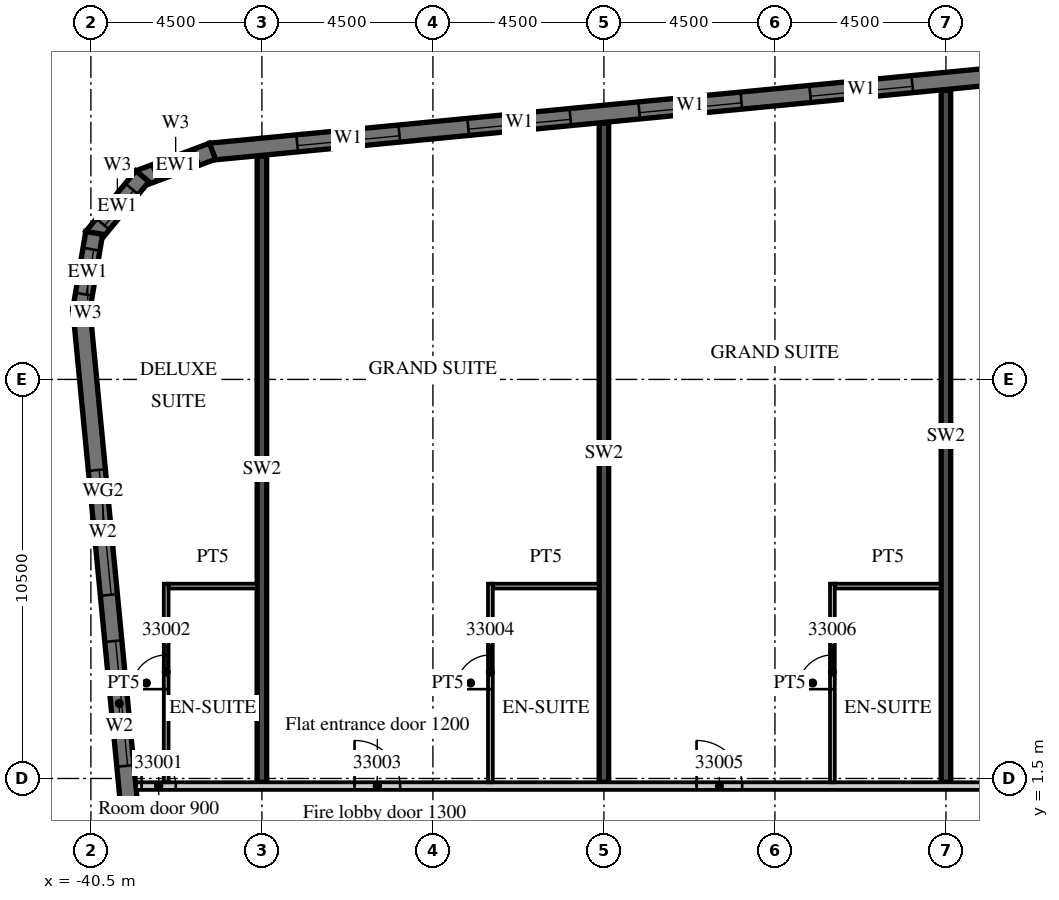
"""IFC4 building model, lengths in metres.
Left out: names, types, materials, properties, quantities, classifications, styles, units other than length and angle.
Written with IfcOpenShell. Run it as: python <this file> out.ifc"""

import sys

from ifc_helpers import new_model, si_unit, direction, frame, frame_2d, origin, place, context, subcontext, project, spatial, polyline, rectangle, outline, extrude, element, fill, save


model = new_model("IFC4")
c1 = context("Model", 3, precision=1e-05, world=origin(), true_north=direction((0.0, 1.0)))
c2 = subcontext(c1, "Body", "Model", "MODEL_VIEW")
j1 = project(units=[si_unit("LENGTHUNIT", "METRE"), si_unit("PLANEANGLEUNIT", "RADIAN")], contexts=[c1])
p1 = place(None, origin())
s1 = spatial("IfcSite", under=j1, at=p1, CompositionType="ELEMENT")
p2 = place(p1, origin())
s2 = spatial("IfcBuilding", under=s1, at=p2, CompositionType="ELEMENT")
p3 = place(p2, frame((0.0, 0.0, 143.8)))
s3 = spatial("IfcBuildingStorey", under=s2, at=p3, CompositionType="ELEMENT", Elevation=143.8)
p4 = place(p3, frame((-36.0, 1.4, 0.0), z_axis=(0.0, 0.0, 1.0), x_axis=(0.0, 1.0, 0.0)))
e1 = element("IfcWall", 1, at=p4, inside=s3, PredefinedType="SHEAR", context=c2, shape_type="SweptSolid", body=[
    extrude(rectangle(XDim=16.474, YDim=0.25, at=frame_2d((8.237, 0.0))), origin(), (0.0, 0.0, 1.0), 3.3),
])
p5 = place(p3, frame((-27.0, 1.4, 0.0), z_axis=(0.0, 0.0, 1.0), x_axis=(0.0, 1.0, 0.0)))
e2 = element("IfcWall", 2, at=p5, inside=s3, PredefinedType="SHEAR", context=c2, shape_type="SweptSolid", body=[
    extrude(rectangle(XDim=17.34, YDim=0.25, at=frame_2d((8.67, 0.0))), origin(), (0.0, 0.0, 1.0), 3.3),
])
p6 = place(p3, frame((-18.0, 1.4, 0.0), z_axis=(0.0, 0.0, 1.0), x_axis=(0.0, 1.0, 0.0)))
e3 = element("IfcWall", 3, at=p6, inside=s3, PredefinedType="SHEAR", context=c2, shape_type="SweptSolid", body=[
    extrude(rectangle(XDim=18.207, YDim=0.25, at=frame_2d((9.104, 0.0))), origin(), (0.0, 0.0, 1.0), 3.3),
])
p7 = place(p3, frame((-40.753, 13.872, 0.0), z_axis=(0.0, 0.0, 1.0), x_axis=(0.095843327381, -0.995396431878, 0.0)))
e4 = element("IfcWall", 4, at=p7, inside=s3, PredefinedType="SOLIDWALL", context=c2, shape_type="SweptSolid", body=[
    extrude(rectangle(XDim=35.0, YDim=0.45, at=frame_2d((17.5, 0.0))), origin(), (0.0, 0.0, 1.0), 3.02),
])
p8 = place(p7, frame((4.277, 0.0, 0.45)))
e5 = element("IfcOpeningElement", 5, at=p8, cuts=e4, PredefinedType="OPENING", context=c2, shape_type="SweptSolid", body=[
    extrude(rectangle(XDim=3.3, YDim=2.25, at=frame_2d((1.65, 1.125))), frame((0.0, 0.235, 0.0), z_axis=(0.0, -1.0, 0.0), x_axis=(1.0, 0.0, 0.0)), (0.0, 0.0, 1.0), 0.47),
])
p9 = place(p7, frame((8.798, 0.0, 0.45)))
e6 = element("IfcOpeningElement", 6, at=p9, cuts=e4, PredefinedType="OPENING", context=c2, shape_type="SweptSolid", body=[
    extrude(rectangle(XDim=3.3, YDim=2.25, at=frame_2d((1.65, 1.125))), frame((0.0, 0.235, 0.0), z_axis=(0.0, -1.0, 0.0), x_axis=(1.0, 0.0, 0.0)), (0.0, 0.0, 1.0), 0.47),
])
p10 = place(p3, frame((13.521, 22.89, 0.0), z_axis=(0.0, 0.0, 1.0), x_axis=(-0.995396445054, -0.095843190545, 0.0)))
e7 = element("IfcWall", 7, at=p10, inside=s3, PredefinedType="SOLIDWALL", context=c2, shape_type="SweptSolid", body=[
    extrude(rectangle(XDim=51.114, YDim=0.45, at=frame_2d((25.557, 0.0))), origin(), (0.0, 0.0, 1.0), 3.02),
])
p11 = place(p10, frame((0.91, 0.0, 0.45)))
e8 = element("IfcOpeningElement", 8, at=p11, cuts=e7, PredefinedType="OPENING", context=c2, shape_type="SweptSolid", body=[
    extrude(rectangle(XDim=2.7, YDim=2.25, at=frame_2d((1.35, 1.125))), frame((0.0, 0.235, 0.0), z_axis=(0.0, -1.0, 0.0), x_axis=(1.0, 0.0, 0.0)), (0.0, 0.0, 1.0), 0.47),
])
p12 = place(p10, frame((5.431, 0.0, 0.45)))
e9 = element("IfcOpeningElement", 9, at=p12, cuts=e7, PredefinedType="OPENING", context=c2, shape_type="SweptSolid", body=[
    extrude(rectangle(XDim=2.7, YDim=2.25, at=frame_2d((1.35, 1.125))), frame((0.0, 0.235, 0.0), z_axis=(0.0, -1.0, 0.0), x_axis=(1.0, 0.0, 0.0)), (0.0, 0.0, 1.0), 0.47),
])
p13 = place(p10, frame((9.952, 0.0, 0.45)))
e10 = element("IfcOpeningElement", 10, at=p13, cuts=e7, PredefinedType="OPENING", context=c2, shape_type="SweptSolid", body=[
    extrude(rectangle(XDim=2.7, YDim=2.25, at=frame_2d((1.35, 1.125))), frame((0.0, 0.235, 0.0), z_axis=(0.0, -1.0, 0.0), x_axis=(1.0, 0.0, 0.0)), (0.0, 0.0, 1.0), 0.47),
])
p14 = place(p10, frame((14.473, 0.0, 0.45)))
e11 = element("IfcOpeningElement", 11, at=p14, cuts=e7, PredefinedType="OPENING", context=c2, shape_type="SweptSolid", body=[
    extrude(rectangle(XDim=2.7, YDim=2.25, at=frame_2d((1.35, 1.125))), frame((0.0, 0.235, 0.0), z_axis=(0.0, -1.0, 0.0), x_axis=(1.0, 0.0, 0.0)), (0.0, 0.0, 1.0), 0.47),
])
p15 = place(p10, frame((18.994, 0.0, 0.45)))
e12 = element("IfcOpeningElement", 12, at=p15, cuts=e7, PredefinedType="OPENING", context=c2, shape_type="SweptSolid", body=[
    extrude(rectangle(XDim=2.7, YDim=2.25, at=frame_2d((1.35, 1.125))), frame((0.0, 0.235, 0.0), z_axis=(0.0, -1.0, 0.0), x_axis=(1.0, 0.0, 0.0)), (0.0, 0.0, 1.0), 0.47),
])
p16 = place(p10, frame((23.514, 0.0, 0.45)))
e13 = element("IfcOpeningElement", 13, at=p16, cuts=e7, PredefinedType="OPENING", context=c2, shape_type="SweptSolid", body=[
    extrude(rectangle(XDim=2.7, YDim=2.25, at=frame_2d((1.35, 1.125))), frame((0.0, 0.235, 0.0), z_axis=(0.0, -1.0, 0.0), x_axis=(1.0, 0.0, 0.0)), (0.0, 0.0, 1.0), 0.47),
])
p17 = place(p10, frame((28.035, 0.0, 0.45)))
e14 = element("IfcOpeningElement", 14, at=p17, cuts=e7, PredefinedType="OPENING", context=c2, shape_type="SweptSolid", body=[
    extrude(rectangle(XDim=2.7, YDim=2.25, at=frame_2d((1.35, 1.125))), frame((0.0, 0.235, 0.0), z_axis=(0.0, -1.0, 0.0), x_axis=(1.0, 0.0, 0.0)), (0.0, 0.0, 1.0), 0.47),
])
p18 = place(p10, frame((32.556, 0.0, 0.45)))
e15 = element("IfcOpeningElement", 15, at=p18, cuts=e7, PredefinedType="OPENING", context=c2, shape_type="SweptSolid", body=[
    extrude(rectangle(XDim=2.7, YDim=2.25, at=frame_2d((1.35, 1.125))), frame((0.0, 0.235, 0.0), z_axis=(0.0, -1.0, 0.0), x_axis=(1.0, 0.0, 0.0)), (0.0, 0.0, 1.0), 0.47),
])
p19 = place(p10, frame((37.077, 0.0, 0.45)))
e16 = element("IfcOpeningElement", 16, at=p19, cuts=e7, PredefinedType="OPENING", context=c2, shape_type="SweptSolid", body=[
    extrude(rectangle(XDim=2.7, YDim=2.25, at=frame_2d((1.35, 1.125))), frame((0.0, 0.235, 0.0), z_axis=(0.0, -1.0, 0.0), x_axis=(1.0, 0.0, 0.0)), (0.0, 0.0, 1.0), 0.47),
])
p20 = place(p10, frame((41.598, 0.0, 0.45)))
e17 = element("IfcOpeningElement", 17, at=p20, cuts=e7, PredefinedType="OPENING", context=c2, shape_type="SweptSolid", body=[
    extrude(rectangle(XDim=2.7, YDim=2.25, at=frame_2d((1.35, 1.125))), frame((0.0, 0.235, 0.0), z_axis=(0.0, -1.0, 0.0), x_axis=(1.0, 0.0, 0.0)), (0.0, 0.0, 1.0), 0.47),
])
p21 = place(p10, frame((46.118, 0.0, 0.45)))
e18 = element("IfcOpeningElement", 18, at=p21, cuts=e7, PredefinedType="OPENING", context=c2, shape_type="SweptSolid", body=[
    extrude(rectangle(XDim=2.7, YDim=2.25, at=frame_2d((1.35, 1.125))), frame((0.0, 0.235, 0.0), z_axis=(0.0, -1.0, 0.0), x_axis=(1.0, 0.0, 0.0)), (0.0, 0.0, 1.0), 0.47),
])
p22 = place(p3, frame((-37.3, 18.004, 0.0), z_axis=(0.0, 0.0, 1.0), x_axis=(-0.936677599948, -0.350192909346, 0.0)))
e19 = element("IfcWall", 19, at=p22, inside=s3, PredefinedType="SOLIDWALL", context=c2, shape_type="SweptSolid", body=[
    extrude(outline(polyline([(0.0, -0.225), (2.071, -0.225), (1.95, 0.225), (0.121, 0.225), (0.0, -0.225)])), origin(), (0.0, 0.0, 1.0), 3.02),
])
p23 = place(p22, frame((0.435, 0.0, 0.45)))
e20 = element("IfcOpeningElement", 20, at=p23, cuts=e19, PredefinedType="OPENING", context=c2, shape_type="SweptSolid", body=[
    extrude(rectangle(XDim=1.2, YDim=2.25, at=frame_2d((0.6, 1.125))), frame((0.0, 0.235, 0.0), z_axis=(0.0, -1.0, 0.0), x_axis=(1.0, 0.0, 0.0)), (0.0, 0.0, 1.0), 0.47),
])
p24 = place(p3, frame((-39.145, 17.347, 0.0), z_axis=(0.0, 0.0, 1.0), x_axis=(-0.636046112757, -0.771651049663, 0.0)))
e21 = element("IfcWall", 21, at=p24, inside=s3, PredefinedType="SOLIDWALL", context=c2, shape_type="SweptSolid", body=[
    extrude(outline(polyline([(0.0, -0.225), (2.071, -0.225), (1.95, 0.225), (0.121, 0.225), (0.0, -0.225)])), origin(), (0.0, 0.0, 1.0), 3.02),
])
p25 = place(p24, frame((0.435, 0.0, 0.45)))
e22 = element("IfcOpeningElement", 22, at=p25, cuts=e21, PredefinedType="OPENING", context=c2, shape_type="SweptSolid", body=[
    extrude(rectangle(XDim=1.2, YDim=2.25, at=frame_2d((0.6, 1.125))), frame((0.0, 0.235, 0.0), z_axis=(0.0, -1.0, 0.0), x_axis=(1.0, 0.0, 0.0)), (0.0, 0.0, 1.0), 0.47),
])
p26 = place(p3, frame((-40.413, 15.855, 0.0), z_axis=(0.0, 0.0, 1.0), x_axis=(-0.165068144653, -0.986282164302, 0.0)))
e23 = element("IfcWall", 23, at=p26, inside=s3, PredefinedType="SOLIDWALL", context=c2, shape_type="SweptSolid", body=[
    extrude(outline(polyline([(0.0, -0.225), (2.071, -0.225), (1.95, 0.225), (0.121, 0.225), (0.0, -0.225)])), origin(), (0.0, 0.0, 1.0), 3.02),
])
p27 = place(p26, frame((0.435, 0.0, 0.45)))
e24 = element("IfcOpeningElement", 24, at=p27, cuts=e23, PredefinedType="OPENING", context=c2, shape_type="SweptSolid", body=[
    extrude(rectangle(XDim=1.2, YDim=2.25, at=frame_2d((0.6, 1.125))), frame((0.0, 0.235, 0.0), z_axis=(0.0, -1.0, 0.0), x_axis=(1.0, 0.0, 0.0)), (0.0, 0.0, 1.0), 0.47),
])
p28 = place(p3, frame((-39.316, 1.3, 0.0), z_axis=(0.0, 0.0, 1.0), x_axis=(1.0, 0.0, 0.0)))
e25 = element("IfcWall", 25, at=p28, inside=s3, PredefinedType="PARTITIONING", context=c2, shape_type="SweptSolid", body=[
    extrude(rectangle(XDim=52.816, YDim=0.2, at=frame_2d((26.408, 0.0))), origin(), (0.0, 0.0, 1.0), 3.02),
])
p29 = place(p28, frame((0.15, 0.0, 0.0)))
e26 = element("IfcOpeningElement", 26, at=p29, cuts=e25, PredefinedType="OPENING", context=c2, shape_type="SweptSolid", body=[
    extrude(rectangle(XDim=0.9, YDim=2.1, at=frame_2d((0.45, 1.05))), frame((0.0, 0.11, 0.0), z_axis=(0.0, -1.0, 0.0), x_axis=(1.0, 0.0, 0.0)), (0.0, 0.0, 1.0), 0.22),
])
p30 = place(p28, frame((5.754, 0.0, 0.0)))
e27 = element("IfcOpeningElement", 27, at=p30, cuts=e25, PredefinedType="OPENING", context=c2, shape_type="SweptSolid", body=[
    extrude(rectangle(XDim=1.2, YDim=2.1, at=frame_2d((0.6, 1.05))), frame((0.0, 0.11, 0.0), z_axis=(0.0, -1.0, 0.0), x_axis=(1.0, 0.0, 0.0)), (0.0, 0.0, 1.0), 0.22),
])
p31 = place(p28, frame((14.754, 0.0, 0.0)))
e28 = element("IfcOpeningElement", 28, at=p31, cuts=e25, PredefinedType="OPENING", context=c2, shape_type="SweptSolid", body=[
    extrude(rectangle(XDim=1.2, YDim=2.1, at=frame_2d((0.6, 1.05))), frame((0.0, 0.11, 0.0), z_axis=(0.0, -1.0, 0.0), x_axis=(1.0, 0.0, 0.0)), (0.0, 0.0, 1.0), 0.22),
])
p32 = place(p28, frame((23.754, 0.0, 0.0)))
e29 = element("IfcOpeningElement", 29, at=p32, cuts=e25, PredefinedType="OPENING", context=c2, shape_type="SweptSolid", body=[
    extrude(rectangle(XDim=1.2, YDim=2.1, at=frame_2d((0.6, 1.05))), frame((0.0, 0.11, 0.0), z_axis=(0.0, -1.0, 0.0), x_axis=(1.0, 0.0, 0.0)), (0.0, 0.0, 1.0), 0.22),
])
p33 = place(p28, frame((35.678, 0.0, 0.0)))
e30 = element("IfcOpeningElement", 30, at=p33, cuts=e25, PredefinedType="OPENING", context=c2, shape_type="SweptSolid", body=[
    extrude(rectangle(XDim=1.2, YDim=2.1, at=frame_2d((0.6, 1.05))), frame((0.0, 0.11, 0.0), z_axis=(0.0, -1.0, 0.0), x_axis=(1.0, 0.0, 0.0)), (0.0, 0.0, 1.0), 0.22),
])
p34 = place(p28, frame((44.678, 0.0, 0.0)))
e31 = element("IfcOpeningElement", 31, at=p34, cuts=e25, PredefinedType="OPENING", context=c2, shape_type="SweptSolid", body=[
    extrude(rectangle(XDim=1.2, YDim=2.1, at=frame_2d((0.6, 1.05))), frame((0.0, 0.11, 0.0), z_axis=(0.0, -1.0, 0.0), x_axis=(1.0, 0.0, 0.0)), (0.0, 0.0, 1.0), 0.22),
])
p35 = place(p28, frame((51.241, 0.0, 0.0)))
e32 = element("IfcOpeningElement", 32, at=p35, cuts=e25, PredefinedType="OPENING", context=c2, shape_type="SweptSolid", body=[
    extrude(rectangle(XDim=1.0, YDim=2.1, at=frame_2d((0.5, 1.05))), frame((0.0, 0.11, 0.0), z_axis=(0.0, -1.0, 0.0), x_axis=(1.0, 0.0, 0.0)), (0.0, 0.0, 1.0), 0.22),
])
p36 = place(p3, frame((-38.519, 1.4, 0.0), z_axis=(0.0, 0.0, 1.0), x_axis=(0.0, 1.0, 0.0)))
e33 = element("IfcWall", 33, at=p36, inside=s3, PredefinedType="PARTITIONING", context=c2, shape_type="SweptSolid", body=[
    extrude(rectangle(XDim=5.225, YDim=0.125, at=frame_2d((2.613, 0.0))), origin(), (0.0, 0.0, 1.0), 3.02),
])
p37 = place(p36, frame((2.45, 0.0, 0.0)))
e34 = element("IfcOpeningElement", 34, at=p37, cuts=e33, PredefinedType="OPENING", context=c2, shape_type="SweptSolid", body=[
    extrude(rectangle(XDim=0.9, YDim=2.1, at=frame_2d((0.45, 1.05))), frame((0.0, 0.073, 0.0), z_axis=(0.0, -1.0, 0.0), x_axis=(1.0, 0.0, 0.0)), (0.0, 0.0, 1.0), 0.145),
])
p38 = place(p3, frame((-38.457, 6.562, 0.0), z_axis=(0.0, 0.0, 1.0), x_axis=(1.0, 0.0, 0.0)))
e35 = element("IfcWall", 35, at=p38, inside=s3, PredefinedType="PARTITIONING", context=c2, shape_type="SweptSolid", body=[
    extrude(rectangle(XDim=2.332, YDim=0.125, at=frame_2d((1.166, 0.0))), origin(), (0.0, 0.0, 1.0), 3.02),
])
p39 = place(p3, frame((-29.988, 1.4, 0.0), z_axis=(0.0, 0.0, 1.0), x_axis=(0.0, 1.0, 0.0)))
e36 = element("IfcWall", 36, at=p39, inside=s3, PredefinedType="PARTITIONING", context=c2, shape_type="SweptSolid", body=[
    extrude(rectangle(XDim=5.225, YDim=0.125, at=frame_2d((2.613, 0.0))), origin(), (0.0, 0.0, 1.0), 3.02),
])
p40 = place(p39, frame((2.45, 0.0, 0.0)))
e37 = element("IfcOpeningElement", 37, at=p40, cuts=e36, PredefinedType="OPENING", context=c2, shape_type="SweptSolid", body=[
    extrude(rectangle(XDim=0.9, YDim=2.1, at=frame_2d((0.45, 1.05))), frame((0.0, 0.073, 0.0), z_axis=(0.0, -1.0, 0.0), x_axis=(1.0, 0.0, 0.0)), (0.0, 0.0, 1.0), 0.145),
])
p41 = place(p3, frame((-29.925, 6.562, 0.0), z_axis=(0.0, 0.0, 1.0), x_axis=(1.0, 0.0, 0.0)))
e38 = element("IfcWall", 38, at=p41, inside=s3, PredefinedType="PARTITIONING", context=c2, shape_type="SweptSolid", body=[
    extrude(rectangle(XDim=2.8, YDim=0.125, at=frame_2d((1.4, 0.0))), origin(), (0.0, 0.0, 1.0), 3.02),
])
p42 = place(p3, frame((-20.988, 1.4, 0.0), z_axis=(0.0, 0.0, 1.0), x_axis=(0.0, 1.0, 0.0)))
e39 = element("IfcWall", 39, at=p42, inside=s3, PredefinedType="PARTITIONING", context=c2, shape_type="SweptSolid", body=[
    extrude(rectangle(XDim=5.225, YDim=0.125, at=frame_2d((2.613, 0.0))), origin(), (0.0, 0.0, 1.0), 3.02),
])
p43 = place(p42, frame((2.45, 0.0, 0.0)))
e40 = element("IfcOpeningElement", 40, at=p43, cuts=e39, PredefinedType="OPENING", context=c2, shape_type="SweptSolid", body=[
    extrude(rectangle(XDim=0.9, YDim=2.1, at=frame_2d((0.45, 1.05))), frame((0.0, 0.073, 0.0), z_axis=(0.0, -1.0, 0.0), x_axis=(1.0, 0.0, 0.0)), (0.0, 0.0, 1.0), 0.145),
])
p44 = place(p3, frame((-20.925, 6.562, 0.0), z_axis=(0.0, 0.0, 1.0), x_axis=(1.0, 0.0, 0.0)))
e41 = element("IfcWall", 41, at=p44, inside=s3, PredefinedType="PARTITIONING", context=c2, shape_type="SweptSolid", body=[
    extrude(rectangle(XDim=2.8, YDim=0.125, at=frame_2d((1.4, 0.0))), origin(), (0.0, 0.0, 1.0), 3.02),
])
p45 = place(p8, origin())
e42 = element("IfcWindow", 42, at=p45, inside=s3, PartitioningType="SINGLE_PANEL", PredefinedType="WINDOW", context=c2, shape_type="SweptSolid", body=[
    extrude(rectangle(XDim=3.3, YDim=2.25, at=frame_2d((1.65, 1.125))), frame((0.0, 0.09, 0.0), z_axis=(0.0, -1.0, 0.0), x_axis=(1.0, 0.0, 0.0)), (0.0, 0.0, 1.0), 0.06),
])
fill(e5, e42)
p46 = place(p9, origin())
e43 = element("IfcWindow", 43, at=p46, inside=s3, PartitioningType="SINGLE_PANEL", PredefinedType="WINDOW", context=c2, shape_type="SweptSolid", body=[
    extrude(rectangle(XDim=3.3, YDim=2.25, at=frame_2d((1.65, 1.125))), frame((0.0, 0.09, 0.0), z_axis=(0.0, -1.0, 0.0), x_axis=(1.0, 0.0, 0.0)), (0.0, 0.0, 1.0), 0.06),
])
fill(e6, e43)
p47 = place(p18, origin())
e44 = element("IfcWindow", 44, at=p47, inside=s3, PartitioningType="SINGLE_PANEL", PredefinedType="WINDOW", context=c2, shape_type="SweptSolid", body=[
    extrude(rectangle(XDim=2.7, YDim=2.25, at=frame_2d((1.35, 1.125))), frame((0.0, 0.09, 0.0), z_axis=(0.0, -1.0, 0.0), x_axis=(1.0, 0.0, 0.0)), (0.0, 0.0, 1.0), 0.06),
])
fill(e15, e44)
p48 = place(p19, origin())
e45 = element("IfcWindow", 45, at=p48, inside=s3, PartitioningType="SINGLE_PANEL", PredefinedType="WINDOW", context=c2, shape_type="SweptSolid", body=[
    extrude(rectangle(XDim=2.7, YDim=2.25, at=frame_2d((1.35, 1.125))), frame((0.0, 0.09, 0.0), z_axis=(0.0, -1.0, 0.0), x_axis=(1.0, 0.0, 0.0)), (0.0, 0.0, 1.0), 0.06),
])
fill(e16, e45)
p49 = place(p20, origin())
e46 = element("IfcWindow", 46, at=p49, inside=s3, PartitioningType="SINGLE_PANEL", PredefinedType="WINDOW", context=c2, shape_type="SweptSolid", body=[
    extrude(rectangle(XDim=2.7, YDim=2.25, at=frame_2d((1.35, 1.125))), frame((0.0, 0.09, 0.0), z_axis=(0.0, -1.0, 0.0), x_axis=(1.0, 0.0, 0.0)), (0.0, 0.0, 1.0), 0.06),
])
fill(e17, e46)
p50 = place(p21, origin())
e47 = element("IfcWindow", 47, at=p50, inside=s3, PartitioningType="SINGLE_PANEL", PredefinedType="WINDOW", context=c2, shape_type="SweptSolid", body=[
    extrude(rectangle(XDim=2.7, YDim=2.25, at=frame_2d((1.35, 1.125))), frame((0.0, 0.09, 0.0), z_axis=(0.0, -1.0, 0.0), x_axis=(1.0, 0.0, 0.0)), (0.0, 0.0, 1.0), 0.06),
])
fill(e18, e47)
p51 = place(p23, origin())
e48 = element("IfcWindow", 48, at=p51, inside=s3, PartitioningType="SINGLE_PANEL", PredefinedType="WINDOW", context=c2, shape_type="SweptSolid", body=[
    extrude(rectangle(XDim=1.2, YDim=2.25, at=frame_2d((0.6, 1.125))), frame((0.0, 0.09, 0.0), z_axis=(0.0, -1.0, 0.0), x_axis=(1.0, 0.0, 0.0)), (0.0, 0.0, 1.0), 0.06),
])
fill(e20, e48)
p52 = place(p25, origin())
e49 = element("IfcWindow", 49, at=p52, inside=s3, PartitioningType="SINGLE_PANEL", PredefinedType="WINDOW", context=c2, shape_type="SweptSolid", body=[
    extrude(rectangle(XDim=1.2, YDim=2.25, at=frame_2d((0.6, 1.125))), frame((0.0, 0.09, 0.0), z_axis=(0.0, -1.0, 0.0), x_axis=(1.0, 0.0, 0.0)), (0.0, 0.0, 1.0), 0.06),
])
fill(e22, e49)
p53 = place(p27, origin())
e50 = element("IfcWindow", 50, at=p53, inside=s3, PartitioningType="SINGLE_PANEL", PredefinedType="WINDOW", context=c2, shape_type="SweptSolid", body=[
    extrude(rectangle(XDim=1.2, YDim=2.25, at=frame_2d((0.6, 1.125))), frame((0.0, 0.09, 0.0), z_axis=(0.0, -1.0, 0.0), x_axis=(1.0, 0.0, 0.0)), (0.0, 0.0, 1.0), 0.06),
])
fill(e24, e50)
p54 = place(p29, origin())
e51 = element("IfcDoor", 51, at=p54, inside=s3, OperationType="SINGLE_SWING_LEFT", PredefinedType="DOOR", context=c2, shape_type="SweptSolid", body=[
    extrude(rectangle(XDim=0.9, YDim=2.1, at=frame_2d((0.45, 1.05))), frame((0.0, 0.025, 0.0), z_axis=(0.0, -1.0, 0.0), x_axis=(1.0, 0.0, 0.0)), (0.0, 0.0, 1.0), 0.05),
])
fill(e26, e51)
p55 = place(p37, origin())
e52 = element("IfcDoor", 52, at=p55, inside=s3, OperationType="SINGLE_SWING_LEFT", PredefinedType="DOOR", context=c2, shape_type="SweptSolid", body=[
    extrude(rectangle(XDim=0.9, YDim=2.1, at=frame_2d((0.45, 1.05))), frame((0.0, 0.025, 0.0), z_axis=(0.0, -1.0, 0.0), x_axis=(1.0, 0.0, 0.0)), (0.0, 0.0, 1.0), 0.05),
])
fill(e34, e52)
p56 = place(p30, origin())
e53 = element("IfcDoor", 53, at=p56, inside=s3, OperationType="SINGLE_SWING_LEFT", PredefinedType="DOOR", context=c2, shape_type="SweptSolid", body=[
    extrude(rectangle(XDim=1.2, YDim=2.1, at=frame_2d((0.6, 1.05))), frame((0.0, 0.025, 0.0), z_axis=(0.0, -1.0, 0.0), x_axis=(1.0, 0.0, 0.0)), (0.0, 0.0, 1.0), 0.05),
])
fill(e27, e53)
p57 = place(p40, origin())
e54 = element("IfcDoor", 54, at=p57, inside=s3, OperationType="SINGLE_SWING_LEFT", PredefinedType="DOOR", context=c2, shape_type="SweptSolid", body=[
    extrude(rectangle(XDim=0.9, YDim=2.1, at=frame_2d((0.45, 1.05))), frame((0.0, 0.025, 0.0), z_axis=(0.0, -1.0, 0.0), x_axis=(1.0, 0.0, 0.0)), (0.0, 0.0, 1.0), 0.05),
])
fill(e37, e54)
p58 = place(p31, origin())
e55 = element("IfcDoor", 55, at=p58, inside=s3, OperationType="SINGLE_SWING_LEFT", PredefinedType="DOOR", context=c2, shape_type="SweptSolid", body=[
    extrude(rectangle(XDim=1.2, YDim=2.1, at=frame_2d((0.6, 1.05))), frame((0.0, 0.025, 0.0), z_axis=(0.0, -1.0, 0.0), x_axis=(1.0, 0.0, 0.0)), (0.0, 0.0, 1.0), 0.05),
])
fill(e28, e55)
p59 = place(p43, origin())
e56 = element("IfcDoor", 56, at=p59, inside=s3, OperationType="SINGLE_SWING_LEFT", PredefinedType="DOOR", context=c2, shape_type="SweptSolid", body=[
    extrude(rectangle(XDim=0.9, YDim=2.1, at=frame_2d((0.45, 1.05))), frame((0.0, 0.025, 0.0), z_axis=(0.0, -1.0, 0.0), x_axis=(1.0, 0.0, 0.0)), (0.0, 0.0, 1.0), 0.05),
])
fill(e40, e56)
save(model, sys.argv[1])
